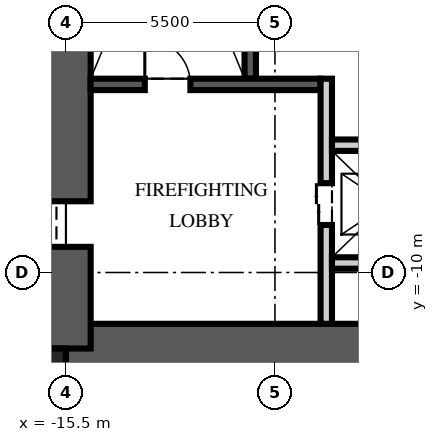
"""IFC4 building model, lengths in metres.
Left out: names, types, materials, properties, quantities, classifications, styles, units other than length and angle.
Written with IfcOpenShell. Run it as: python <this file> out.ifc"""

import sys

from ifc_helpers import new_model, si_unit, direction, frame, frame_2d, origin, origin_2d, place, context, subcontext, project, spatial, rectangle, extrude, element, fill, save


model = new_model("IFC4")
c1 = context("Model", 3, precision=1e-05, world=origin(), true_north=direction((0.0, 1.0)))
c2 = subcontext(c1, "Body", "Model", "MODEL_VIEW")
j1 = project(units=[si_unit("LENGTHUNIT", "METRE"), si_unit("PLANEANGLEUNIT", "RADIAN")], contexts=[c1])
p1 = place(None, origin())
s1 = spatial("IfcSite", under=j1, at=p1, CompositionType="ELEMENT")
p2 = place(p1, origin())
s2 = spatial("IfcBuilding", under=s1, at=p2, CompositionType="ELEMENT")
p3 = place(p2, frame((0.0, 0.0, 353.25)))
s3 = spatial("IfcBuildingStorey", under=s2, at=p3, CompositionType="ELEMENT", Elevation=353.25)
p4 = place(p3, frame((-15.5, -12.0, -0.3), z_axis=(0.0, 0.0, 1.0), x_axis=(1.0, 0.0, 0.0)))
e1 = element("IfcWall", 1, at=p4, inside=s3, PredefinedType="SHEAR", context=c2, shape_type="SweptSolid", body=[
    extrude(rectangle(XDim=31.0, YDim=1.3, at=frame_2d((15.5, 0.0))), origin(), (0.0, 0.0, 1.0), 5.0),
])
p5 = place(p3, frame((-15.5, -12.0, -0.3), z_axis=(0.0, 0.0, 1.0), x_axis=(0.0, 1.0, 0.0)))
e2 = element("IfcWall", 2, at=p5, inside=s3, PredefinedType="SHEAR", context=c2, shape_type="SweptSolid", body=[
    extrude(rectangle(XDim=24.0, YDim=1.3, at=frame_2d((12.0, 0.0))), origin(), (0.0, 0.0, 1.0), 5.0),
])
p6 = place(p5, frame((2.675, 0.0, 0.3)))
e3 = element("IfcOpeningElement", 3, at=p6, cuts=e2, PredefinedType="OPENING", context=c2, shape_type="SweptSolid", body=[
    extrude(rectangle(XDim=1.2, YDim=2.1, at=frame_2d((0.6, 1.05))), frame((0.0, 0.66, 0.0), z_axis=(0.0, -1.0, 0.0), x_axis=(1.0, 0.0, 0.0)), (0.0, 0.0, 1.0), 1.32),
])
p7 = place(p5, frame((20.125, 0.0, 0.3)))
e4 = element("IfcOpeningElement", 4, at=p7, cuts=e2, PredefinedType="OPENING", context=c2, shape_type="SweptSolid", body=[
    extrude(rectangle(XDim=1.8, YDim=2.1, at=frame_2d((0.9, 1.05))), frame((0.0, 0.66, 0.0), z_axis=(0.0, -1.0, 0.0), x_axis=(1.0, 0.0, 0.0)), (0.0, 0.0, 1.0), 1.32),
])
p8 = place(p3, frame((-15.825, -12.325, -0.3), z_axis=(0.0, 0.0, 1.0), x_axis=(1.0, 0.0, 0.0)))
e5 = element("IfcColumn", 5, at=p8, inside=s3, PredefinedType="COLUMN", context=c2, shape_type="SweptSolid", body=[
    extrude(rectangle(XDim=0.65, YDim=0.65, at=origin_2d()), origin(), (0.0, 0.0, 1.0), 5.0),
])
p9 = place(p3, frame((-10.65, -4.9, 0.0), z_axis=(0.0, 0.0, 1.0), x_axis=(0.0, 1.0, 0.0)))
e6 = element("IfcWall", 6, at=p9, inside=s3, PredefinedType="SOLIDWALL", context=c2, shape_type="SweptSolid", body=[
    extrude(rectangle(XDim=10.1, YDim=0.3, at=frame_2d((5.05, 0.0))), origin(), (0.0, 0.0, 1.0), 4.7),
])
p10 = place(p3, frame((-14.85, -5.05, 0.0), z_axis=(0.0, 0.0, 1.0), x_axis=(1.0, 0.0, 0.0)))
e7 = element("IfcWall", 7, at=p10, inside=s3, PredefinedType="SOLIDWALL", context=c2, shape_type="SweptSolid", body=[
    extrude(rectangle(XDim=6.05, YDim=0.3, at=frame_2d((3.025, 0.0))), origin(), (0.0, 0.0, 1.0), 4.7),
])
p11 = place(p10, frame((1.425, 0.0, 0.0)))
e8 = element("IfcOpeningElement", 8, at=p11, cuts=e7, PredefinedType="OPENING", context=c2, shape_type="SweptSolid", body=[
    extrude(rectangle(XDim=1.2, YDim=2.1, at=frame_2d((0.6, 1.05))), frame((0.0, 0.16, 0.0), z_axis=(0.0, -1.0, 0.0), x_axis=(1.0, 0.0, 0.0)), (0.0, 0.0, 1.0), 0.32),
])
p12 = place(p3, frame((-8.65, -11.35, 0.0), z_axis=(0.0, 0.0, 1.0), x_axis=(0.0, 1.0, 0.0)))
e9 = element("IfcWall", 9, at=p12, inside=s3, PredefinedType="PARTITIONING", context=c2, shape_type="SweptSolid", body=[
    extrude(rectangle(XDim=6.45, YDim=0.3, at=frame_2d((3.225, 0.0))), origin(), (0.0, 0.0, 1.0), 4.7),
])
p13 = place(p12, frame((2.6, 0.0, 0.0)))
e10 = element("IfcOpeningElement", 10, at=p13, cuts=e9, PredefinedType="OPENING", context=c2, shape_type="SweptSolid", body=[
    extrude(rectangle(XDim=1.1, YDim=2.1, at=frame_2d((0.55, 1.05))), frame((0.0, 0.16, 0.0), z_axis=(0.0, -1.0, 0.0), x_axis=(1.0, 0.0, 0.0)), (0.0, 0.0, 1.0), 0.32),
])
p14 = place(p3, frame((-8.5, -6.65, 0.0), z_axis=(0.0, 0.0, 1.0), x_axis=(1.0, 0.0, 0.0)))
e11 = element("IfcWall", 11, at=p14, inside=s3, PredefinedType="PARTITIONING", context=c2, shape_type="SweptSolid", body=[
    extrude(rectangle(XDim=17.0, YDim=0.3, at=frame_2d((8.5, 0.0))), origin(), (0.0, 0.0, 1.0), 4.7),
])
p15 = place(p14, frame((7.8, 0.0, 0.0)))
e12 = element("IfcOpeningElement", 12, at=p15, cuts=e11, PredefinedType="OPENING", context=c2, shape_type="SweptSolid", body=[
    extrude(rectangle(XDim=1.3, YDim=2.4, at=frame_2d((0.65, 1.2))), frame((0.0, 0.16, 0.0), z_axis=(0.0, -1.0, 0.0), x_axis=(1.0, 0.0, 0.0)), (0.0, 0.0, 1.0), 0.32),
])
p16 = place(p14, frame((5.65, 0.0, 0.0)))
e13 = element("IfcOpeningElement", 13, at=p16, cuts=e11, PredefinedType="OPENING", context=c2, shape_type="SweptSolid", body=[
    extrude(rectangle(XDim=0.9, YDim=2.1, at=frame_2d((0.45, 1.05))), frame((0.0, 0.16, 0.0), z_axis=(0.0, -1.0, 0.0), x_axis=(1.0, 0.0, 0.0)), (0.0, 0.0, 1.0), 0.32),
])
p17 = place(p14, frame((10.4, 0.0, 0.0)))
e14 = element("IfcOpeningElement", 14, at=p17, cuts=e11, PredefinedType="OPENING", context=c2, shape_type="SweptSolid", body=[
    extrude(rectangle(XDim=0.9, YDim=2.1, at=frame_2d((0.45, 1.05))), frame((0.0, 0.16, 0.0), z_axis=(0.0, -1.0, 0.0), x_axis=(1.0, 0.0, 0.0)), (0.0, 0.0, 1.0), 0.32),
])
p18 = place(p3, frame((-8.5, -9.75, 0.0), z_axis=(0.0, 0.0, 1.0), x_axis=(1.0, 0.0, 0.0)))
e15 = element("IfcWall", 15, at=p18, inside=s3, PredefinedType="PARTITIONING", context=c2, shape_type="SweptSolid", body=[
    extrude(rectangle(XDim=2.9, YDim=0.3, at=frame_2d((1.45, 0.0))), origin(), (0.0, 0.0, 1.0), 4.7),
])
p19 = place(p11, origin())
e16 = element("IfcDoor", 16, at=p19, inside=s3, OperationType="SINGLE_SWING_LEFT", PredefinedType="DOOR", context=c2, shape_type="SweptSolid", body=[
    extrude(rectangle(XDim=1.2, YDim=2.1, at=frame_2d((0.6, 1.05))), frame((0.0, 0.025, 0.0), z_axis=(0.0, -1.0, 0.0), x_axis=(1.0, 0.0, 0.0)), (0.0, 0.0, 1.0), 0.05),
])
fill(e8, e16)
p20 = place(p6, origin())
e17 = element("IfcDoor", 17, at=p20, inside=s3, OperationType="SINGLE_SWING_LEFT", PredefinedType="DOOR", context=c2, shape_type="SweptSolid", body=[
    extrude(rectangle(XDim=1.2, YDim=2.1, at=frame_2d((0.6, 1.05))), frame((0.0, 0.025, 0.0), z_axis=(0.0, -1.0, 0.0), x_axis=(1.0, 0.0, 0.0)), (0.0, 0.0, 1.0), 0.05),
])
fill(e3, e17)
p21 = place(p13, origin())
e18 = element("IfcDoor", 18, at=p21, inside=s3, OperationType="DOUBLE_DOOR_SLIDING", PredefinedType="DOOR", context=c2, shape_type="SweptSolid", body=[
    extrude(rectangle(XDim=1.1, YDim=2.1, at=frame_2d((0.55, 1.05))), frame((0.0, 0.025, 0.0), z_axis=(0.0, -1.0, 0.0), x_axis=(1.0, 0.0, 0.0)), (0.0, 0.0, 1.0), 0.05),
])
fill(e10, e18)
save(model, sys.argv[1])
